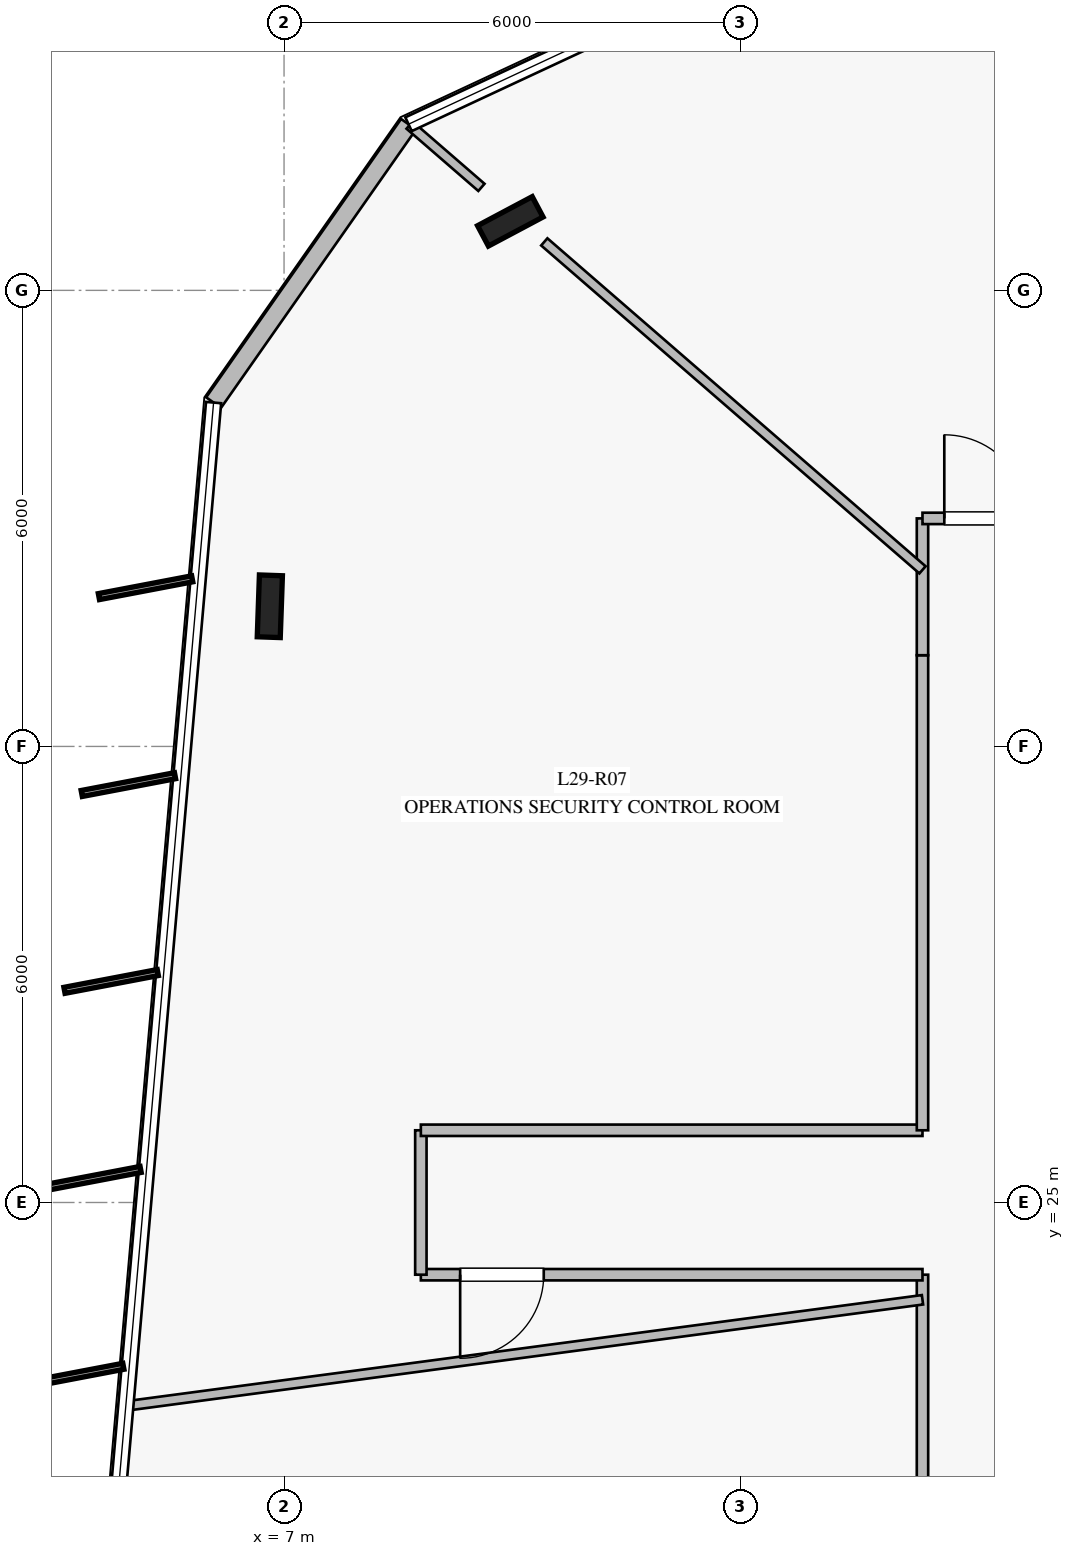
"""IFC4 building model, lengths in metres.
Left out: names, types, materials, properties, quantities, classifications, styles, units other than length and angle.
Written with IfcOpenShell. Run it as: python <this file> out.ifc"""

import sys

from ifc_helpers import new_model, si_unit, direction, frame, frame_2d, origin, origin_2d, place, context, subcontext, project, spatial, rectangle, i_section, extrude, element, fill, save


model = new_model("IFC4")
c1 = context("Model", 3, precision=1e-05, world=origin(), true_north=direction((0.0, 1.0)))
c2 = subcontext(c1, "Body", "Model", "MODEL_VIEW")
j1 = project(units=[si_unit("LENGTHUNIT", "METRE"), si_unit("PLANEANGLEUNIT", "RADIAN")], contexts=[c1])
p1 = place(None, origin())
s1 = spatial("IfcSite", under=j1, at=p1, CompositionType="ELEMENT")
p2 = place(p1, origin())
s2 = spatial("IfcBuilding", under=s1, at=p2, CompositionType="ELEMENT")
p3 = place(p2, frame((0.0, 0.0, 122.4)))
s3 = spatial("IfcBuildingStorey", under=s2, at=p3, CompositionType="ELEMENT", Elevation=122.4)
for number, where, z_axis, x_axis in (
    (1, (9.977, 37.908, 0.0), (0.0, 0.0, 1.0), (0.883, 0.469, 0.0)),
    (2, (6.813, 32.844, 0.0), (0.0, 0.0, 1.0), (0.035, 0.999, 0.0)),
):
    element("IfcColumn", number, at=place(p3, frame(where, z_axis=z_axis, x_axis=x_axis)), inside=s3, PredefinedType="COLUMN", context=c2, shape_type="SweptSolid", body=[
        extrude(i_section(OverallWidth=0.303, OverallDepth=0.814, WebThickness=0.021, FlangeThickness=0.04, at=origin_2d()), origin(), (0.0, 0.0, 1.0), 4.0),
    ])
p4 = place(p3, frame((8.638, 39.186, 0.0), z_axis=(0.0, 0.0, 1.0), x_axis=(-0.57368221041, -0.819077970317, 0.0)))
e3 = element("IfcWall", 3, at=p4, inside=s3, PredefinedType="STANDARD", context=c2, shape_type="SweptSolid", body=[
    extrude(rectangle(XDim=4.471, YDim=0.24, at=frame_2d((2.235, 0.0))), origin(), (0.0, 0.0, 1.0), 3.76),
])
p5 = place(p3, frame((15.4, 17.8, 0.0), z_axis=(0.0, 0.0, 1.0), x_axis=(0.0, 1.0, 0.0)))
e4 = element("IfcWall", 4, at=p5, inside=s3, PredefinedType="PARTITIONING", context=c2, shape_type="SweptSolid", body=[
    extrude(rectangle(XDim=6.25, YDim=0.15, at=frame_2d((3.125, 0.0))), origin(), (0.0, 0.0, 1.0), 3.21),
])
p6 = place(p3, frame((15.4, 24.05, 0.0), z_axis=(0.0, 0.0, 1.0), x_axis=(-1.0, 0.0, 0.0)))
e5 = element("IfcWall", 5, at=p6, inside=s3, PredefinedType="PARTITIONING", context=c2, shape_type="SweptSolid", body=[
    extrude(rectangle(XDim=6.6, YDim=0.15, at=frame_2d((3.3, 0.0))), origin(), (0.0, 0.0, 1.0), 3.05),
])
p7 = place(p6, frame((4.983, 0.0, 0.0)))
e6 = element("IfcOpeningElement", 6, at=p7, cuts=e5, PredefinedType="OPENING", context=c2, shape_type="SweptSolid", body=[
    extrude(rectangle(XDim=1.1, YDim=2.2, at=frame_2d((0.55, 1.1))), frame((0.0, 0.085, 0.0), z_axis=(0.0, -1.0, 0.0), x_axis=(1.0, 0.0, 0.0)), (0.0, 0.0, 1.0), 0.17),
])
p8 = place(p3, frame((8.8, 24.05, 0.0), z_axis=(0.0, 0.0, 1.0), x_axis=(0.0, 1.0, 0.0)))
e7 = element("IfcWall", 7, at=p8, inside=s3, PredefinedType="PARTITIONING", context=c2, shape_type="SweptSolid", body=[
    extrude(rectangle(XDim=1.9, YDim=0.15, at=frame_2d((0.95, 0.0))), origin(), (0.0, 0.0, 1.0), 3.3),
])
p9 = place(p3, frame((8.8, 25.95, 0.0), z_axis=(0.0, 0.0, 1.0), x_axis=(1.0, 0.0, 0.0)))
e8 = element("IfcWall", 8, at=p9, inside=s3, PredefinedType="PARTITIONING", context=c2, shape_type="SweptSolid", body=[
    extrude(rectangle(XDim=6.6, YDim=0.15, at=frame_2d((3.3, 0.0))), origin(), (0.0, 0.0, 1.0), 3.05),
])
p10 = place(p3, frame((15.4, 25.95, 0.0), z_axis=(0.0, 0.0, 1.0), x_axis=(0.0, 1.0, 0.0)))
e9 = element("IfcWall", 9, at=p10, inside=s3, PredefinedType="PARTITIONING", context=c2, shape_type="SweptSolid", body=[
    extrude(rectangle(XDim=6.25, YDim=0.15, at=frame_2d((3.125, 0.0))), origin(), (0.0, 0.0, 1.0), 3.21),
])
p11 = place(p3, frame((15.4, 32.2, 0.0), z_axis=(0.0, 0.0, 1.0), x_axis=(0.0, 1.0, 0.0)))
e10 = element("IfcWall", 10, at=p11, inside=s3, PredefinedType="PARTITIONING", context=c2, shape_type="SweptSolid", body=[
    extrude(rectangle(XDim=1.8, YDim=0.15, at=frame_2d((0.9, 0.0))), origin(), (0.0, 0.0, 1.0), 3.21),
])
p12 = place(p3, frame((15.4, 34.0, 0.0), z_axis=(0.0, 0.0, 1.0), x_axis=(1.0, 0.0, 0.0)))
e11 = element("IfcWall", 11, at=p12, inside=s3, PredefinedType="PARTITIONING", context=c2, shape_type="SweptSolid", body=[
    extrude(rectangle(XDim=1.8, YDim=0.15, at=frame_2d((0.9, 0.0))), origin(), (0.0, 0.0, 1.0), 3.76),
])
p13 = place(p12, frame((0.287, 0.0, 0.0)))
e12 = element("IfcOpeningElement", 12, at=p13, cuts=e11, PredefinedType="OPENING", context=c2, shape_type="SweptSolid", body=[
    extrude(rectangle(XDim=1.1, YDim=2.2, at=frame_2d((0.55, 1.1))), frame((0.0, 0.085, 0.0), z_axis=(0.0, -1.0, 0.0), x_axis=(1.0, 0.0, 0.0)), (0.0, 0.0, 1.0), 0.17),
])
p14 = place(p3, frame((15.4, 33.323, 0.0), z_axis=(0.0, 0.0, 1.0), x_axis=(-0.755497026954, 0.655152075677, 0.0)))
e13 = element("IfcWall", 13, at=p14, inside=s3, PredefinedType="PARTITIONING", context=c2, shape_type="SweptSolid", body=[
    extrude(rectangle(XDim=6.586, YDim=0.125, at=frame_2d((3.293, 0.0))), origin(), (0.0, 0.0, 1.0), 3.21),
])
p15 = place(p3, frame((9.597, 38.355, 0.0), z_axis=(0.0, 0.0, 1.0), x_axis=(-0.755592443886, 0.655042028226, 0.0)))
e14 = element("IfcWall", 14, at=p15, inside=s3, PredefinedType="PARTITIONING", context=c2, shape_type="SweptSolid", body=[
    extrude(rectangle(XDim=1.25, YDim=0.125, at=frame_2d((0.625, 0.0))), origin(), (0.0, 0.0, 1.0), 3.76),
])
p16 = place(p3, frame((15.4, 23.72, 0.0), z_axis=(0.0, 0.0, 1.0), x_axis=(-0.991229920406, -0.132148571283, 0.0)))
e15 = element("IfcWall", 15, at=p16, inside=s3, PredefinedType="PARTITIONING", context=c2, shape_type="SweptSolid", body=[
    extrude(rectangle(XDim=10.556, YDim=0.125, at=frame_2d((5.278, 0.0))), origin(), (0.0, 0.0, 1.0), 3.05),
])
p17 = place(p13, origin())
e16 = element("IfcDoor", 16, at=p17, inside=s3, OperationType="SINGLE_SWING_LEFT", PredefinedType="DOOR", context=c2, shape_type="SweptSolid", body=[
    extrude(rectangle(XDim=1.1, YDim=2.2, at=frame_2d((0.55, 1.1))), frame((0.0, 0.025, 0.0), z_axis=(0.0, -1.0, 0.0), x_axis=(1.0, 0.0, 0.0)), (0.0, 0.0, 1.0), 0.05),
])
fill(e12, e16)
p18 = place(p7, origin())
e17 = element("IfcDoor", 17, at=p18, inside=s3, OperationType="SINGLE_SWING_RIGHT", PredefinedType="DOOR", context=c2, shape_type="SweptSolid", body=[
    extrude(rectangle(XDim=1.1, YDim=2.2, at=frame_2d((0.55, 1.1))), frame((0.0, 0.025, 0.0), z_axis=(0.0, -1.0, 0.0), x_axis=(1.0, 0.0, 0.0)), (0.0, 0.0, 1.0), 0.05),
])
fill(e6, e17)
save(model, sys.argv[1])
